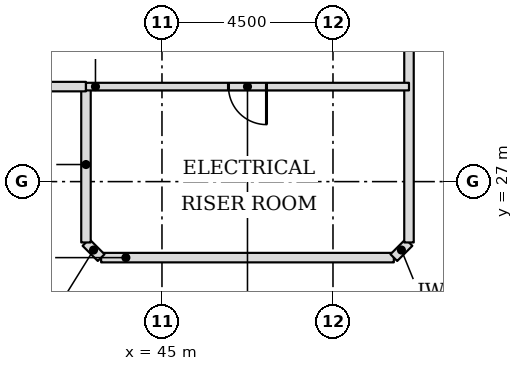
"""IFC4 building model, lengths in metres.
Left out: names, types, materials, properties, quantities, classifications, styles, units other than length and angle.
Written with IfcOpenShell. Run it as: python <this file> out.ifc"""

import sys

from ifc_helpers import new_model, si_unit, direction, frame, frame_2d, origin, place, context, subcontext, project, spatial, rectangle, extrude, element, fill, save


model = new_model("IFC4")
c1 = context("Model", 3, precision=1e-05, world=origin(), true_north=direction((0.0, 1.0)))
c2 = subcontext(c1, "Body", "Model", "MODEL_VIEW")
j1 = project(units=[si_unit("LENGTHUNIT", "METRE"), si_unit("PLANEANGLEUNIT", "RADIAN")], contexts=[c1])
p1 = place(None, origin())
s1 = spatial("IfcSite", under=j1, at=p1, CompositionType="ELEMENT")
p2 = place(p1, origin())
s2 = spatial("IfcBuilding", under=s1, at=p2, CompositionType="ELEMENT")
p3 = place(p2, frame((0.0, 0.0, 138.1)))
s3 = spatial("IfcBuildingStorey", under=s2, at=p3, CompositionType="ELEMENT", Elevation=138.1)
p4 = place(p3, frame((43.399, 25.0, 0.0), z_axis=(0.0, 0.0, 1.0), x_axis=(1.0, 0.0, 0.0)))
e1 = element("IfcWall", 1, at=p4, inside=s3, PredefinedType="PARTITIONING", context=c2, shape_type="SweptSolid", body=[
    extrude(rectangle(XDim=7.702, YDim=0.25, at=frame_2d((3.851, 0.0))), origin(), (0.0, 0.0, 1.0), 4.85),
])
for number, where, z_axis, x_axis in (
    (2, (51.101, 25.0, 0.0), (0.0, 0.0, 1.0), (0.707, 0.707, 0.0)),
    (3, (43.0, 25.399, 0.0), (0.0, 0.0, 1.0), (0.707, -0.707, 0.0)),
):
    element("IfcWall", number, at=place(p3, frame(where, z_axis=z_axis, x_axis=x_axis)), inside=s3, PredefinedType="PARTITIONING", context=c2, shape_type="SweptSolid", body=[
        extrude(rectangle(XDim=0.564, YDim=0.25, at=frame_2d((0.282, 0.0))), origin(), (0.0, 0.0, 1.0), 4.85),
    ])
p5 = place(p3, frame((43.0, 25.399, 0.0), z_axis=(0.0, 0.0, 1.0), x_axis=(0.0, 1.0, 0.0)))
e4 = element("IfcWall", 4, at=p5, inside=s3, PredefinedType="PARTITIONING", context=c2, shape_type="SweptSolid", body=[
    extrude(rectangle(XDim=4.101, YDim=0.25, at=frame_2d((2.051, 0.0))), origin(), (0.0, 0.0, 1.0), 4.85),
])
p6 = place(p3, frame((51.5, 25.399, 0.0), z_axis=(0.0, 0.0, 1.0), x_axis=(0.0, 1.0, 0.0)))
e5 = element("IfcWall", 5, at=p6, inside=s3, PredefinedType="PARTITIONING", context=c2, shape_type="SweptSolid", body=[
    extrude(rectangle(XDim=22.101, YDim=0.25, at=frame_2d((11.051, 0.0))), origin(), (0.0, 0.0, 1.0), 4.85),
])
p7 = place(p3, frame((38.5, 29.5, 0.0), z_axis=(0.0, 0.0, 1.0), x_axis=(1.0, 0.0, 0.0)))
e6 = element("IfcWall", 6, at=p7, inside=s3, PredefinedType="PARTITIONING", context=c2, shape_type="SweptSolid", body=[
    extrude(rectangle(XDim=4.5, YDim=0.25, at=frame_2d((2.25, 0.0))), origin(), (0.0, 0.0, 1.0), 4.85),
])
p8 = place(p3, frame((43.0, 29.5, 0.0), z_axis=(0.0, 0.0, 1.0), x_axis=(1.0, 0.0, 0.0)))
e7 = element("IfcWall", 7, at=p8, inside=s3, PredefinedType="PARTITIONING", context=c2, shape_type="SweptSolid", body=[
    extrude(rectangle(XDim=8.5, YDim=0.2, at=frame_2d((4.25, 0.0))), origin(), (0.0, 0.0, 1.0), 4.85),
])
p9 = place(p8, frame((3.75, 0.0, 0.0)))
e8 = element("IfcOpeningElement", 8, at=p9, cuts=e7, PredefinedType="OPENING", context=c2, shape_type="SweptSolid", body=[
    extrude(rectangle(XDim=1.0, YDim=2.1, at=frame_2d((0.5, 1.05))), frame((0.0, 0.11, 0.0), z_axis=(0.0, -1.0, 0.0), x_axis=(1.0, 0.0, 0.0)), (0.0, 0.0, 1.0), 0.22),
])
p10 = place(p9, frame((1.0, 0.0, 0.0), z_axis=(0.0, 0.0, 1.0), x_axis=(-1.0, 0.0, 0.0)))
e9 = element("IfcDoor", 9, at=p10, inside=s3, OperationType="SINGLE_SWING_LEFT", PredefinedType="DOOR", context=c2, shape_type="SweptSolid", body=[
    extrude(rectangle(XDim=1.0, YDim=2.1, at=frame_2d((0.5, 1.05))), frame((0.0, 0.025, 0.0), z_axis=(0.0, -1.0, 0.0), x_axis=(1.0, 0.0, 0.0)), (0.0, 0.0, 1.0), 0.05),
])
fill(e8, e9)
save(model, sys.argv[1])
